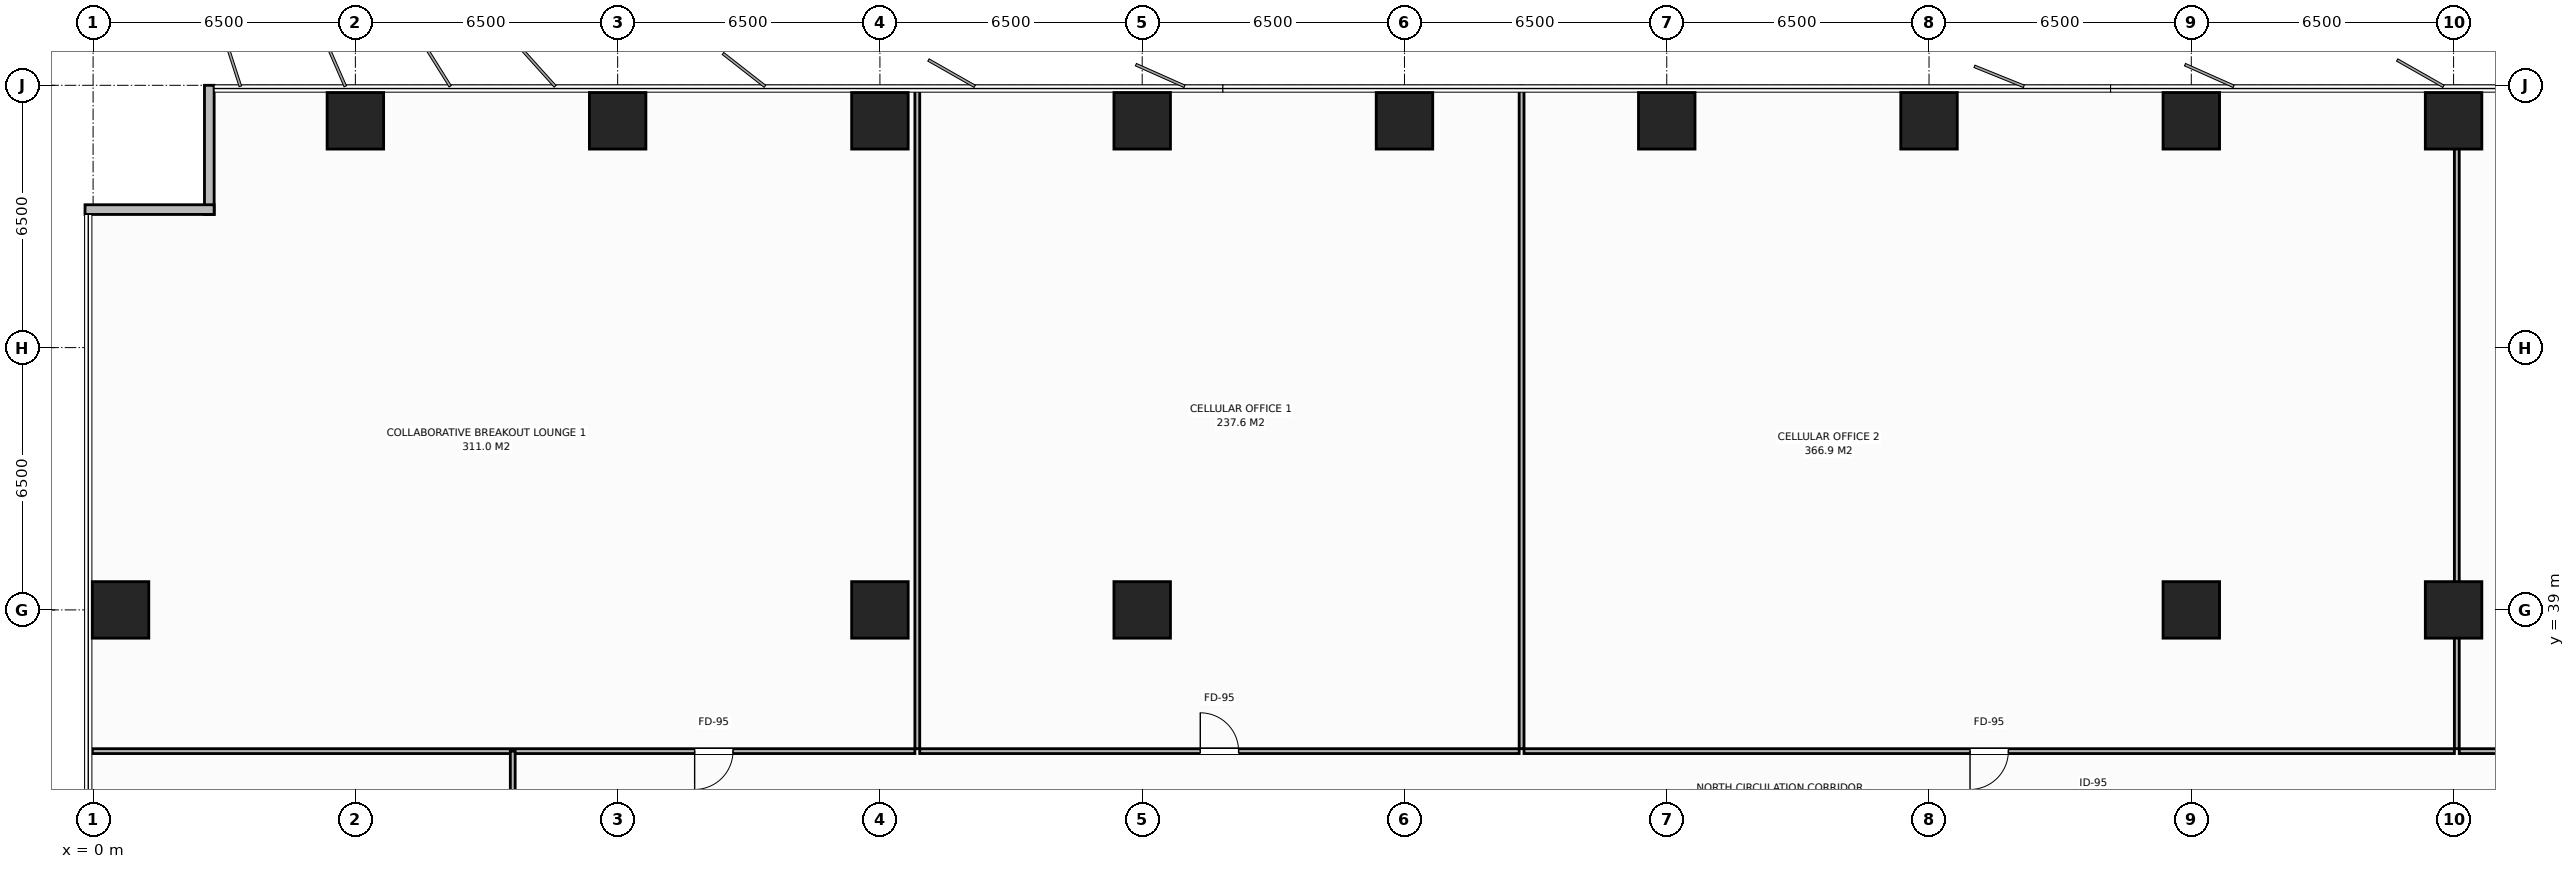
"""IFC4 building model, lengths in metres.
Left out: names, types, materials, properties, quantities, classifications, styles, units other than length and angle.
Written with IfcOpenShell. Run it as: python <this file> out.ifc"""

import sys

from ifc_helpers import new_model, si_unit, direction, frame, frame_2d, origin, origin_2d, place, context, subcontext, project, spatial, rectangle, extrude, element, fill, save


model = new_model("IFC4")
c1 = context("Model", 3, precision=1e-05, world=origin(), true_north=direction((0.0, 1.0)))
c2 = subcontext(c1, "Body", "Model", "MODEL_VIEW")
j1 = project(units=[si_unit("LENGTHUNIT", "METRE"), si_unit("PLANEANGLEUNIT", "RADIAN")], contexts=[c1])
p1 = place(None, origin())
s1 = spatial("IfcSite", under=j1, at=p1, CompositionType="ELEMENT")
p2 = place(p1, origin())
s2 = spatial("IfcBuilding", under=s1, at=p2, CompositionType="ELEMENT")
p3 = place(p2, frame((0.0, 0.0, 46.8)))
s3 = spatial("IfcBuildingStorey", under=s2, at=p3, CompositionType="ELEMENT", Elevation=46.8)
for number, where, z_axis, x_axis in (
    (1, (19.5, 39.0, 0.0), (0.0, 0.0, 1.0), (1.0, 0.0, 0.0)),
    (2, (58.5, 39.0, 0.0), (0.0, 0.0, 1.0), (1.0, 0.0, 0.0)),
    (3, (26.0, 39.0, 0.0), (0.0, 0.0, 1.0), (1.0, 0.0, 0.0)),
    (4, (52.0, 39.0, 0.0), (0.0, 0.0, 1.0), (1.0, 0.0, 0.0)),
    (5, (6.5, 51.12, 0.0), (0.0, 0.0, 1.0), (1.0, 0.0, 0.0)),
    (6, (13.0, 51.12, 0.0), (0.0, 0.0, 1.0), (1.0, 0.0, 0.0)),
    (7, (19.5, 51.12, 0.0), (0.0, 0.0, 1.0), (1.0, 0.0, 0.0)),
    (8, (26.0, 51.12, 0.0), (0.0, 0.0, 1.0), (1.0, 0.0, 0.0)),
    (9, (32.5, 51.12, 0.0), (0.0, 0.0, 1.0), (1.0, 0.0, 0.0)),
    (10, (39.0, 51.12, 0.0), (0.0, 0.0, 1.0), (1.0, 0.0, 0.0)),
    (11, (45.5, 51.12, 0.0), (0.0, 0.0, 1.0), (1.0, 0.0, 0.0)),
    (12, (52.0, 51.12, 0.0), (0.0, 0.0, 1.0), (1.0, 0.0, 0.0)),
    (13, (58.5, 51.12, 0.0), (0.0, 0.0, 1.0), (1.0, 0.0, 0.0)),
    (14, (0.68, 39.0, 0.0), (0.0, 0.0, 1.0), (1.0, 0.0, 0.0)),
):
    element("IfcColumn", number, at=place(p3, frame(where, z_axis=z_axis, x_axis=x_axis)), inside=s3, PredefinedType="COLUMN", context=c2, shape_type="SweptSolid", body=[
        extrude(rectangle(XDim=1.4, YDim=1.4, at=origin_2d()), origin(), (0.0, 0.0, 1.0), 3.8),
    ])
for number, where, z_axis, x_axis in (
    (15, (2.88, 48.8, 0.0), (0.0, 0.0, 1.0), (0.0, 1.0, 0.0)),
    (16, (-0.2, 48.92, 0.0), (0.0, 0.0, 1.0), (1.0, 0.0, 0.0)),
):
    element("IfcWall", number, at=place(p3, frame(where, z_axis=z_axis, x_axis=x_axis)), inside=s3, PredefinedType="STANDARD", context=c2, shape_type="SweptSolid", body=[
        extrude(rectangle(XDim=3.2, YDim=0.24, at=frame_2d((1.6, 0.0))), origin(), (0.0, 0.0, 1.0), 3.55),
    ])
p4 = place(p3, frame((20.427, 35.56, 0.0), z_axis=(0.0, 0.0, 1.0), x_axis=(0.0, 1.0, 0.0)))
e17 = element("IfcWall", 17, at=p4, inside=s3, PredefinedType="PARTITIONING", context=c2, shape_type="SweptSolid", body=[
    extrude(rectangle(XDim=16.42, YDim=0.12, at=frame_2d((8.21, 0.0))), origin(), (0.0, 0.0, 1.0), 3.55),
])
p5 = place(p3, frame((-0.02, 35.5, 0.0), z_axis=(0.0, 0.0, 1.0), x_axis=(1.0, 0.0, 0.0)))
e18 = element("IfcWall", 18, at=p5, inside=s3, PredefinedType="PARTITIONING", context=c2, shape_type="SweptSolid", body=[
    extrude(rectangle(XDim=20.386, YDim=0.12, at=frame_2d((10.193, 0.0))), origin(), (0.0, 0.0, 1.0), 3.55),
])
p6 = place(p5, frame((14.928, 0.0, 0.0)))
e19 = element("IfcOpeningElement", 19, at=p6, cuts=e18, PredefinedType="OPENING", context=c2, shape_type="SweptSolid", body=[
    extrude(rectangle(XDim=0.95, YDim=2.15, at=frame_2d((0.475, 1.075))), frame((0.0, 0.07, 0.0), z_axis=(0.0, -1.0, 0.0), x_axis=(1.0, 0.0, 0.0)), (0.0, 0.0, 1.0), 0.14),
])
p7 = place(p3, frame((35.402, 35.56, 0.0), z_axis=(0.0, 0.0, 1.0), x_axis=(0.0, 1.0, 0.0)))
e20 = element("IfcWall", 20, at=p7, inside=s3, PredefinedType="PARTITIONING", context=c2, shape_type="SweptSolid", body=[
    extrude(rectangle(XDim=16.42, YDim=0.12, at=frame_2d((8.21, 0.0))), origin(), (0.0, 0.0, 1.0), 3.55),
])
p8 = place(p3, frame((20.487, 35.5, 0.0), z_axis=(0.0, 0.0, 1.0), x_axis=(1.0, 0.0, 0.0)))
e21 = element("IfcWall", 21, at=p8, inside=s3, PredefinedType="PARTITIONING", context=c2, shape_type="SweptSolid", body=[
    extrude(rectangle(XDim=14.856, YDim=0.12, at=frame_2d((7.428, 0.0))), origin(), (0.0, 0.0, 1.0), 3.55),
])
p9 = place(p8, frame((6.953, 0.0, 0.0)))
e22 = element("IfcOpeningElement", 22, at=p9, cuts=e21, PredefinedType="OPENING", context=c2, shape_type="SweptSolid", body=[
    extrude(rectangle(XDim=0.95, YDim=2.15, at=frame_2d((0.475, 1.075))), frame((0.0, 0.07, 0.0), z_axis=(0.0, -1.0, 0.0), x_axis=(1.0, 0.0, 0.0)), (0.0, 0.0, 1.0), 0.14),
])
p10 = place(p3, frame((58.58, 35.56, 0.0), z_axis=(0.0, 0.0, 1.0), x_axis=(0.0, 1.0, 0.0)))
e23 = element("IfcWall", 23, at=p10, inside=s3, PredefinedType="PARTITIONING", context=c2, shape_type="SweptSolid", body=[
    extrude(rectangle(XDim=16.42, YDim=0.12, at=frame_2d((8.21, 0.0))), origin(), (0.0, 0.0, 1.0), 2.9),
])
p11 = place(p3, frame((35.462, 35.5, 0.0), z_axis=(0.0, 0.0, 1.0), x_axis=(1.0, 0.0, 0.0)))
e24 = element("IfcWall", 24, at=p11, inside=s3, PredefinedType="PARTITIONING", context=c2, shape_type="SweptSolid", body=[
    extrude(rectangle(XDim=23.058, YDim=0.12, at=frame_2d((11.529, 0.0))), origin(), (0.0, 0.0, 1.0), 3.55),
])
p12 = place(p11, frame((11.054, 0.0, 0.0)))
e25 = element("IfcOpeningElement", 25, at=p12, cuts=e24, PredefinedType="OPENING", context=c2, shape_type="SweptSolid", body=[
    extrude(rectangle(XDim=0.95, YDim=2.15, at=frame_2d((0.475, 1.075))), frame((0.0, 0.07, 0.0), z_axis=(0.0, -1.0, 0.0), x_axis=(1.0, 0.0, 0.0)), (0.0, 0.0, 1.0), 0.14),
])
p13 = place(p3, frame((58.64, 35.5, 0.0), z_axis=(0.0, 0.0, 1.0), x_axis=(1.0, 0.0, 0.0)))
e26 = element("IfcWall", 26, at=p13, inside=s3, PredefinedType="PARTITIONING", context=c2, shape_type="SweptSolid", body=[
    extrude(rectangle(XDim=19.38, YDim=0.12, at=frame_2d((9.69, 0.0))), origin(), (0.0, 0.0, 1.0), 3.55),
])
p14 = place(p13, frame((4.005, 0.0, 0.0)))
e27 = element("IfcOpeningElement", 27, at=p14, cuts=e26, PredefinedType="OPENING", context=c2, shape_type="SweptSolid", body=[
    extrude(rectangle(XDim=0.95, YDim=2.15, at=frame_2d((0.475, 1.075))), frame((0.0, 0.07, 0.0), z_axis=(0.0, -1.0, 0.0), x_axis=(1.0, 0.0, 0.0)), (0.0, 0.0, 1.0), 0.14),
])
p15 = place(p3, frame((10.4, 26.0, 0.0), z_axis=(0.0, 0.0, 1.0), x_axis=(0.0, 1.0, 0.0)))
e28 = element("IfcWall", 28, at=p15, inside=s3, PredefinedType="PARTITIONING", context=c2, shape_type="SweptSolid", body=[
    extrude(rectangle(XDim=9.5, YDim=0.12, at=frame_2d((4.75, 0.0))), origin(), (0.0, 0.0, 1.0), 3.55),
])
p16 = place(p15, frame((3.225, 0.0, 0.0)))
e29 = element("IfcOpeningElement", 29, at=p16, cuts=e28, PredefinedType="OPENING", context=c2, shape_type="SweptSolid", body=[
    extrude(rectangle(XDim=0.95, YDim=2.15, at=frame_2d((0.475, 1.075))), frame((0.0, 0.07, 0.0), z_axis=(0.0, -1.0, 0.0), x_axis=(1.0, 0.0, 0.0)), (0.0, 0.0, 1.0), 0.14),
])
p17 = place(p6, origin())
e30 = element("IfcDoor", 30, at=p17, inside=s3, OperationType="SINGLE_SWING_RIGHT", PredefinedType="DOOR", context=c2, shape_type="SweptSolid", body=[
    extrude(rectangle(XDim=0.95, YDim=2.15, at=frame_2d((0.475, 1.075))), frame((0.0, 0.025, 0.0), z_axis=(0.0, -1.0, 0.0), x_axis=(1.0, 0.0, 0.0)), (0.0, 0.0, 1.0), 0.05),
])
fill(e19, e30)
p18 = place(p9, origin())
e31 = element("IfcDoor", 31, at=p18, inside=s3, OperationType="SINGLE_SWING_LEFT", PredefinedType="DOOR", context=c2, shape_type="SweptSolid", body=[
    extrude(rectangle(XDim=0.95, YDim=2.15, at=frame_2d((0.475, 1.075))), frame((0.0, 0.025, 0.0), z_axis=(0.0, -1.0, 0.0), x_axis=(1.0, 0.0, 0.0)), (0.0, 0.0, 1.0), 0.05),
])
fill(e22, e31)
p19 = place(p12, origin())
e32 = element("IfcDoor", 32, at=p19, inside=s3, OperationType="SINGLE_SWING_RIGHT", PredefinedType="DOOR", context=c2, shape_type="SweptSolid", body=[
    extrude(rectangle(XDim=0.95, YDim=2.15, at=frame_2d((0.475, 1.075))), frame((0.0, 0.025, 0.0), z_axis=(0.0, -1.0, 0.0), x_axis=(1.0, 0.0, 0.0)), (0.0, 0.0, 1.0), 0.05),
])
fill(e25, e32)
save(model, sys.argv[1])
